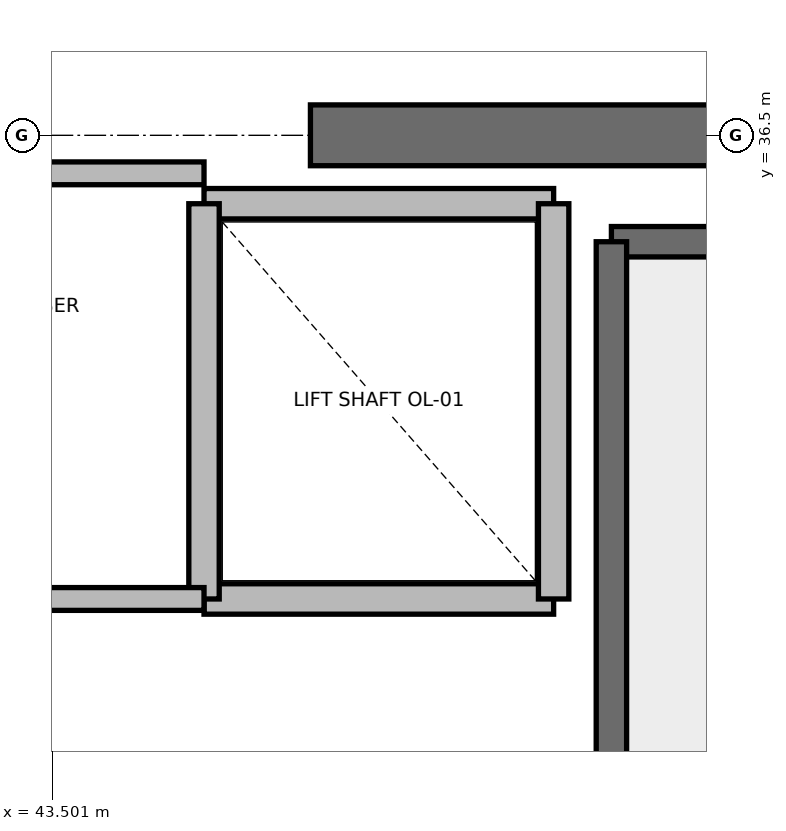
"""IFC4 building model, lengths in metres.
Left out: names, types, materials, properties, quantities, classifications, styles, units other than length and angle.
Written with IfcOpenShell. Run it as: python <this file> out.ifc"""

import sys

from ifc_helpers import new_model, si_unit, direction, frame, frame_2d, origin, place, context, subcontext, project, spatial, rectangle, extrude, element, save


model = new_model("IFC4")
c1 = context("Model", 3, precision=1e-05, world=origin(), true_north=direction((0.0, 1.0)))
c2 = subcontext(c1, "Body", "Model", "MODEL_VIEW")
j1 = project(units=[si_unit("LENGTHUNIT", "METRE"), si_unit("PLANEANGLEUNIT", "RADIAN")], contexts=[c1])
p1 = place(None, origin())
s1 = spatial("IfcSite", under=j1, at=p1, CompositionType="ELEMENT")
p2 = place(p1, origin())
s2 = spatial("IfcBuilding", under=s1, at=p2, CompositionType="ELEMENT")
p3 = place(p2, frame((0.0, 0.0, 334.8)))
s3 = spatial("IfcBuildingStorey", under=s2, at=p3, CompositionType="ELEMENT", Elevation=334.8)
p4 = place(p3, frame((45.2, 36.5, 0.0), z_axis=(0.0, 0.0, 1.0), x_axis=(1.0, 0.0, 0.0)))
e1 = element("IfcWall", 1, at=p4, inside=s3, PredefinedType="SHEAR", context=c2, shape_type="SweptSolid", body=[
    extrude(rectangle(XDim=5.8, YDim=0.4, at=frame_2d((2.9, 0.0))), origin(), (0.0, 0.0, 1.0), 3.785),
])
p5 = place(p3, frame((47.18, 35.8, 0.0), z_axis=(0.0, 0.0, 1.0), x_axis=(1.0, 0.0, 0.0)))
e2 = element("IfcWall", 2, at=p5, inside=s3, PredefinedType="SOLIDWALL", context=c2, shape_type="SweptSolid", body=[
    extrude(rectangle(XDim=3.12, YDim=0.2, at=frame_2d((1.56, 0.0))), origin(), (0.0, 0.0, 1.0), 3.785),
])
p6 = place(p3, frame((47.18, 27.62, 0.0), z_axis=(0.0, 0.0, 1.0), x_axis=(0.0, 1.0, 0.0)))
e3 = element("IfcWall", 3, at=p6, inside=s3, PredefinedType="SOLIDWALL", context=c2, shape_type="SweptSolid", body=[
    extrude(rectangle(XDim=8.18, YDim=0.2, at=frame_2d((4.09, 0.0))), origin(), (0.0, 0.0, 1.0), 3.785),
])
p7 = place(p3, frame((44.5, 33.45, 0.0), z_axis=(0.0, 0.0, 1.0), x_axis=(1.0, 0.0, 0.0)))
e4 = element("IfcWall", 4, at=p7, inside=s3, PredefinedType="SOLIDWALL", context=c2, shape_type="SweptSolid", body=[
    extrude(rectangle(XDim=2.3, YDim=0.2, at=frame_2d((1.15, 0.0))), origin(), (0.0, 0.0, 1.0), 3.785),
])
p8 = place(p3, frame((46.8, 36.05, 0.0), z_axis=(0.0, 0.0, 1.0), x_axis=(-1.0, 0.0, 0.0)))
e5 = element("IfcWall", 5, at=p8, inside=s3, PredefinedType="SOLIDWALL", context=c2, shape_type="SweptSolid", body=[
    extrude(rectangle(XDim=2.3, YDim=0.2, at=frame_2d((1.15, 0.0))), origin(), (0.0, 0.0, 1.0), 2.865),
])
p9 = place(p3, frame((44.5, 36.05, 0.0), z_axis=(0.0, 0.0, 1.0), x_axis=(0.0, -1.0, 0.0)))
e6 = element("IfcWall", 6, at=p9, inside=s3, PredefinedType="SOLIDWALL", context=c2, shape_type="SweptSolid", body=[
    extrude(rectangle(XDim=2.6, YDim=0.2, at=frame_2d((1.3, 0.0))), origin(), (0.0, 0.0, 1.0), 2.865),
])
p10 = place(p3, frame((46.8, 33.45, 0.0), z_axis=(0.0, 0.0, 1.0), x_axis=(0.0, 1.0, 0.0)))
e7 = element("IfcWall", 7, at=p10, inside=s3, PredefinedType="SOLIDWALL", context=c2, shape_type="SweptSolid", body=[
    extrude(rectangle(XDim=2.6, YDim=0.2, at=frame_2d((1.3, 0.0))), origin(), (0.0, 0.0, 1.0), 3.785),
])
p11 = place(p3, frame((41.56, 36.25, 0.0), z_axis=(0.0, 0.0, 1.0), x_axis=(1.0, 0.0, 0.0)))
e8 = element("IfcWall", 8, at=p11, inside=s3, PredefinedType="PARTITIONING", context=c2, shape_type="SweptSolid", body=[
    extrude(rectangle(XDim=2.94, YDim=0.15, at=frame_2d((1.47, 0.0))), origin(), (0.0, 0.0, 1.0), 2.85),
])
p12 = place(p3, frame((41.56, 33.45, 0.0), z_axis=(0.0, 0.0, 1.0), x_axis=(1.0, 0.0, 0.0)))
e9 = element("IfcWall", 9, at=p12, inside=s3, PredefinedType="PARTITIONING", context=c2, shape_type="SweptSolid", body=[
    extrude(rectangle(XDim=2.94, YDim=0.15, at=frame_2d((1.47, 0.0))), origin(), (0.0, 0.0, 1.0), 2.85),
])
p13 = place(p12, frame((1.03, 0.0, 0.0)))
e10 = element("IfcOpeningElement", 10, at=p13, cuts=e9, PredefinedType="OPENING", context=c2, shape_type="SweptSolid", body=[
    extrude(rectangle(XDim=0.88, YDim=2.1, at=frame_2d((0.44, 1.05))), frame((0.0, 0.075, 0.0), z_axis=(0.0, -1.0, 0.0), x_axis=(1.0, 0.0, 0.0)), (0.0, 0.0, 1.0), 0.15),
])
save(model, sys.argv[1])
